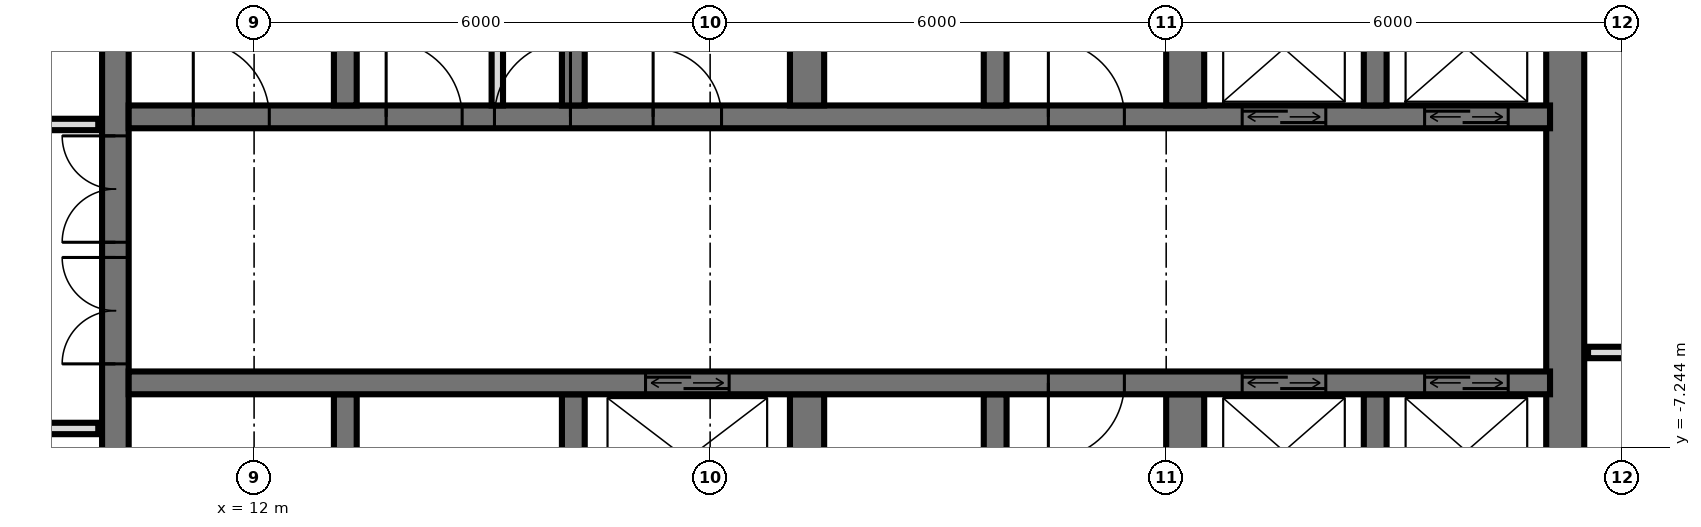
"""IFC4 building model, lengths in metres.
Left out: names, types, materials, properties, quantities, classifications, styles, units other than length and angle.
Written with IfcOpenShell. Run it as: python <this file> out.ifc"""

import sys

from ifc_helpers import new_model, si_unit, direction, frame, frame_2d, origin, place, context, subcontext, project, spatial, rectangle, extrude, element, fill, save


model = new_model("IFC4")
c1 = context("Model", 3, precision=1e-05, world=origin(), true_north=direction((0.0, 1.0)))
c2 = subcontext(c1, "Body", "Model", "MODEL_VIEW")
j1 = project(units=[si_unit("LENGTHUNIT", "METRE"), si_unit("PLANEANGLEUNIT", "RADIAN")], contexts=[c1])
p1 = place(None, origin())
s1 = spatial("IfcSite", under=j1, at=p1, CompositionType="ELEMENT")
p2 = place(p1, origin())
s2 = spatial("IfcBuilding", under=s1, at=p2, CompositionType="ELEMENT")
p3 = place(p2, frame((0.0, 0.0, 45.6)))
s3 = spatial("IfcBuildingStorey", under=s2, at=p3, CompositionType="ELEMENT", Elevation=45.6)
p4 = place(p3, frame((10.175, -14.55, 0.0), z_axis=(0.0, 0.0, 1.0), x_axis=(0.0, 1.0, 0.0)))
e1 = element("IfcWall", 1, at=p4, inside=s3, PredefinedType="SHEAR", context=c2, shape_type="SweptSolid", body=[
    extrude(rectangle(XDim=14.1, YDim=0.35, at=frame_2d((7.05, 0.0))), origin(), (0.0, 0.0, 1.0), 3.6),
])
p5 = place(p4, frame((8.4, 0.0, 0.0)))
e2 = element("IfcOpeningElement", 2, at=p5, cuts=e1, PredefinedType="OPENING", context=c2, shape_type="SweptSolid", body=[
    extrude(rectangle(XDim=1.4, YDim=2.4, at=frame_2d((0.7, 1.2))), frame((0.0, 0.185, 0.0), z_axis=(0.0, -1.0, 0.0), x_axis=(1.0, 0.0, 0.0)), (0.0, 0.0, 1.0), 0.37),
])
p6 = place(p4, frame((10.0, 0.0, 0.0)))
e3 = element("IfcOpeningElement", 3, at=p6, cuts=e1, PredefinedType="OPENING", context=c2, shape_type="SweptSolid", body=[
    extrude(rectangle(XDim=1.4, YDim=2.4, at=frame_2d((0.7, 1.2))), frame((0.0, 0.185, 0.0), z_axis=(0.0, -1.0, 0.0), x_axis=(1.0, 0.0, 0.0)), (0.0, 0.0, 1.0), 0.37),
])
p7 = place(p4, frame((4.0, 0.0, 0.0)))
e4 = element("IfcOpeningElement", 4, at=p7, cuts=e1, PredefinedType="OPENING", context=c2, shape_type="SweptSolid", body=[
    extrude(rectangle(XDim=1.2, YDim=2.1, at=frame_2d((0.6, 1.05))), frame((0.0, 0.185, 0.0), z_axis=(0.0, -1.0, 0.0), x_axis=(1.0, 0.0, 0.0)), (0.0, 0.0, 1.0), 0.37),
])
p8 = place(p3, frame((29.25, -14.55, 0.0), z_axis=(0.0, 0.0, 1.0), x_axis=(0.0, 1.0, 0.0)))
e5 = element("IfcWall", 5, at=p8, inside=s3, PredefinedType="SHEAR", context=c2, shape_type="SweptSolid", body=[
    extrude(rectangle(XDim=14.1, YDim=0.5, at=frame_2d((7.05, 0.0))), origin(), (0.0, 0.0, 1.0), 3.6),
])
p9 = place(p3, frame((10.35, -2.9, 0.0), z_axis=(0.0, 0.0, 1.0), x_axis=(1.0, 0.0, 0.0)))
e6 = element("IfcWall", 6, at=p9, inside=s3, PredefinedType="SHEAR", context=c2, shape_type="SweptSolid", body=[
    extrude(rectangle(XDim=18.7, YDim=0.3, at=frame_2d((9.35, 0.0))), origin(), (0.0, 0.0, 1.0), 3.6),
])
p10 = place(p9, frame((14.65, 0.0, 0.0)))
e7 = element("IfcOpeningElement", 7, at=p10, cuts=e6, PredefinedType="OPENING", context=c2, shape_type="SweptSolid", body=[
    extrude(rectangle(XDim=1.1, YDim=2.1, at=frame_2d((0.55, 1.05))), frame((0.0, 0.16, 0.0), z_axis=(0.0, -1.0, 0.0), x_axis=(1.0, 0.0, 0.0)), (0.0, 0.0, 1.0), 0.32),
])
p11 = place(p9, frame((17.05, 0.0, 0.0)))
e8 = element("IfcOpeningElement", 8, at=p11, cuts=e6, PredefinedType="OPENING", context=c2, shape_type="SweptSolid", body=[
    extrude(rectangle(XDim=1.1, YDim=2.1, at=frame_2d((0.55, 1.05))), frame((0.0, 0.16, 0.0), z_axis=(0.0, -1.0, 0.0), x_axis=(1.0, 0.0, 0.0)), (0.0, 0.0, 1.0), 0.32),
])
p12 = place(p9, frame((6.9, 0.0, 0.0)))
e9 = element("IfcOpeningElement", 9, at=p12, cuts=e6, PredefinedType="OPENING", context=c2, shape_type="SweptSolid", body=[
    extrude(rectangle(XDim=0.9, YDim=2.1, at=frame_2d((0.45, 1.05))), frame((0.0, 0.16, 0.0), z_axis=(0.0, -1.0, 0.0), x_axis=(1.0, 0.0, 0.0)), (0.0, 0.0, 1.0), 0.32),
])
p13 = place(p9, frame((0.85, 0.0, 0.0)))
e10 = element("IfcOpeningElement", 10, at=p13, cuts=e6, PredefinedType="OPENING", context=c2, shape_type="SweptSolid", body=[
    extrude(rectangle(XDim=1.0, YDim=2.1, at=frame_2d((0.5, 1.05))), frame((0.0, 0.16, 0.0), z_axis=(0.0, -1.0, 0.0), x_axis=(1.0, 0.0, 0.0)), (0.0, 0.0, 1.0), 0.32),
])
p14 = place(p9, frame((3.387, 0.0, 0.0)))
e11 = element("IfcOpeningElement", 11, at=p14, cuts=e6, PredefinedType="OPENING", context=c2, shape_type="SweptSolid", body=[
    extrude(rectangle(XDim=1.0, YDim=2.1, at=frame_2d((0.5, 1.05))), frame((0.0, 0.16, 0.0), z_axis=(0.0, -1.0, 0.0), x_axis=(1.0, 0.0, 0.0)), (0.0, 0.0, 1.0), 0.32),
])
p15 = place(p9, frame((4.812, 0.0, 0.0)))
e12 = element("IfcOpeningElement", 12, at=p15, cuts=e6, PredefinedType="OPENING", context=c2, shape_type="SweptSolid", body=[
    extrude(rectangle(XDim=1.0, YDim=2.1, at=frame_2d((0.5, 1.05))), frame((0.0, 0.16, 0.0), z_axis=(0.0, -1.0, 0.0), x_axis=(1.0, 0.0, 0.0)), (0.0, 0.0, 1.0), 0.32),
])
p16 = place(p9, frame((12.1, 0.0, 0.0)))
e13 = element("IfcOpeningElement", 13, at=p16, cuts=e6, PredefinedType="OPENING", context=c2, shape_type="SweptSolid", body=[
    extrude(rectangle(XDim=1.0, YDim=2.1, at=frame_2d((0.5, 1.05))), frame((0.0, 0.16, 0.0), z_axis=(0.0, -1.0, 0.0), x_axis=(1.0, 0.0, 0.0)), (0.0, 0.0, 1.0), 0.32),
])
p17 = place(p3, frame((10.35, -6.4, 0.0), z_axis=(0.0, 0.0, 1.0), x_axis=(1.0, 0.0, 0.0)))
e14 = element("IfcWall", 14, at=p17, inside=s3, PredefinedType="SHEAR", context=c2, shape_type="SweptSolid", body=[
    extrude(rectangle(XDim=18.7, YDim=0.3, at=frame_2d((9.35, 0.0))), origin(), (0.0, 0.0, 1.0), 3.6),
])
p18 = place(p17, frame((14.65, 0.0, 0.0)))
e15 = element("IfcOpeningElement", 15, at=p18, cuts=e14, PredefinedType="OPENING", context=c2, shape_type="SweptSolid", body=[
    extrude(rectangle(XDim=1.1, YDim=2.1, at=frame_2d((0.55, 1.05))), frame((0.0, 0.16, 0.0), z_axis=(0.0, -1.0, 0.0), x_axis=(1.0, 0.0, 0.0)), (0.0, 0.0, 1.0), 0.32),
])
p19 = place(p17, frame((17.05, 0.0, 0.0)))
e16 = element("IfcOpeningElement", 16, at=p19, cuts=e14, PredefinedType="OPENING", context=c2, shape_type="SweptSolid", body=[
    extrude(rectangle(XDim=1.1, YDim=2.1, at=frame_2d((0.55, 1.05))), frame((0.0, 0.16, 0.0), z_axis=(0.0, -1.0, 0.0), x_axis=(1.0, 0.0, 0.0)), (0.0, 0.0, 1.0), 0.32),
])
p20 = place(p17, frame((6.8, 0.0, 0.0)))
e17 = element("IfcOpeningElement", 17, at=p20, cuts=e14, PredefinedType="OPENING", context=c2, shape_type="SweptSolid", body=[
    extrude(rectangle(XDim=1.1, YDim=2.1, at=frame_2d((0.55, 1.05))), frame((0.0, 0.16, 0.0), z_axis=(0.0, -1.0, 0.0), x_axis=(1.0, 0.0, 0.0)), (0.0, 0.0, 1.0), 0.32),
])
p21 = place(p17, frame((12.1, 0.0, 0.0)))
e18 = element("IfcOpeningElement", 18, at=p21, cuts=e14, PredefinedType="OPENING", context=c2, shape_type="SweptSolid", body=[
    extrude(rectangle(XDim=1.0, YDim=2.1, at=frame_2d((0.5, 1.05))), frame((0.0, 0.16, 0.0), z_axis=(0.0, -1.0, 0.0), x_axis=(1.0, 0.0, 0.0)), (0.0, 0.0, 1.0), 0.32),
])
for number, where, z_axis, x_axis in (
    (19, (13.2, -2.75, 0.0), (0.0, 0.0, 1.0), (0.0, 1.0, 0.0)),
    (20, (13.2, -8.85, 0.0), (0.0, 0.0, 1.0), (0.0, 1.0, 0.0)),
    (21, (16.2, -2.75, 0.0), (0.0, 0.0, 1.0), (0.0, 1.0, 0.0)),
    (22, (16.2, -8.85, 0.0), (0.0, 0.0, 1.0), (0.0, 1.0, 0.0)),
):
    element("IfcWall", number, at=place(p3, frame(where, z_axis=z_axis, x_axis=x_axis)), inside=s3, PredefinedType="SHEAR", context=c2, shape_type="SweptSolid", body=[
        extrude(rectangle(XDim=2.3, YDim=0.3, at=frame_2d((1.15, 0.0))), origin(), (0.0, 0.0, 1.0), 3.6),
    ])
for number, where, z_axis, x_axis in (
    (23, (19.275, -2.75, 0.0), (0.0, 0.0, 1.0), (0.0, 1.0, 0.0)),
    (24, (19.275, -8.85, 0.0), (0.0, 0.0, 1.0), (0.0, 1.0, 0.0)),
):
    element("IfcWall", number, at=place(p3, frame(where, z_axis=z_axis, x_axis=x_axis)), inside=s3, PredefinedType="SHEAR", context=c2, shape_type="SweptSolid", body=[
        extrude(rectangle(XDim=2.3, YDim=0.45, at=frame_2d((1.15, 0.0))), origin(), (0.0, 0.0, 1.0), 3.6),
    ])
for number, where, z_axis, x_axis in (
    (25, (21.75, -2.75, 0.0), (0.0, 0.0, 1.0), (0.0, 1.0, 0.0)),
    (26, (21.75, -8.85, 0.0), (0.0, 0.0, 1.0), (0.0, 1.0, 0.0)),
):
    element("IfcWall", number, at=place(p3, frame(where, z_axis=z_axis, x_axis=x_axis)), inside=s3, PredefinedType="SHEAR", context=c2, shape_type="SweptSolid", body=[
        extrude(rectangle(XDim=2.3, YDim=0.3, at=frame_2d((1.15, 0.0))), origin(), (0.0, 0.0, 1.0), 3.6),
    ])
for number, where, z_axis, x_axis in (
    (27, (24.25, -2.75, 0.0), (0.0, 0.0, 1.0), (0.0, 1.0, 0.0)),
    (28, (24.25, -8.85, 0.0), (0.0, 0.0, 1.0), (0.0, 1.0, 0.0)),
):
    element("IfcWall", number, at=place(p3, frame(where, z_axis=z_axis, x_axis=x_axis)), inside=s3, PredefinedType="SHEAR", context=c2, shape_type="SweptSolid", body=[
        extrude(rectangle(XDim=2.3, YDim=0.5, at=frame_2d((1.15, 0.0))), origin(), (0.0, 0.0, 1.0), 3.6),
    ])
for number, where, z_axis, x_axis in (
    (29, (26.75, -2.75, 0.0), (0.0, 0.0, 1.0), (0.0, 1.0, 0.0)),
    (30, (26.75, -8.85, 0.0), (0.0, 0.0, 1.0), (0.0, 1.0, 0.0)),
):
    element("IfcWall", number, at=place(p3, frame(where, z_axis=z_axis, x_axis=x_axis)), inside=s3, PredefinedType="SHEAR", context=c2, shape_type="SweptSolid", body=[
        extrude(rectangle(XDim=2.3, YDim=0.3, at=frame_2d((1.15, 0.0))), origin(), (0.0, 0.0, 1.0), 3.6),
    ])
p22 = place(p3, frame((15.2, -2.75, 0.0), z_axis=(0.0, 0.0, 1.0), x_axis=(0.0, 1.0, 0.0)))
e31 = element("IfcWall", 31, at=p22, inside=s3, PredefinedType="PARTITIONING", context=c2, shape_type="SweptSolid", body=[
    extrude(rectangle(XDim=2.3, YDim=0.15, at=frame_2d((1.15, 0.0))), origin(), (0.0, 0.0, 1.0), 3.3),
])
p23 = place(p3, frame((-9.95, -7.0, 0.0), z_axis=(0.0, 0.0, 1.0), x_axis=(1.0, 0.0, 0.0)))
e32 = element("IfcWall", 32, at=p23, inside=s3, PredefinedType="PARTITIONING", context=c2, shape_type="SweptSolid", body=[
    extrude(rectangle(XDim=19.9, YDim=0.15, at=frame_2d((9.95, 0.0))), origin(), (0.0, 0.0, 1.0), 3.32),
])
p24 = place(p23, frame((9.45, 0.0, 0.0)))
e33 = element("IfcOpeningElement", 33, at=p24, cuts=e32, PredefinedType="OPENING", context=c2, shape_type="SweptSolid", body=[
    extrude(rectangle(XDim=1.0, YDim=2.1, at=frame_2d((0.5, 1.05))), frame((0.0, 0.085, 0.0), z_axis=(0.0, -1.0, 0.0), x_axis=(1.0, 0.0, 0.0)), (0.0, 0.0, 1.0), 0.17),
])
p25 = place(p23, frame((3.45, 0.0, 0.0)))
e34 = element("IfcOpeningElement", 34, at=p25, cuts=e32, PredefinedType="OPENING", context=c2, shape_type="SweptSolid", body=[
    extrude(rectangle(XDim=1.0, YDim=2.1, at=frame_2d((0.5, 1.05))), frame((0.0, 0.085, 0.0), z_axis=(0.0, -1.0, 0.0), x_axis=(1.0, 0.0, 0.0)), (0.0, 0.0, 1.0), 0.17),
])
p26 = place(p3, frame((29.55, -6.0, 0.0), z_axis=(0.0, 0.0, 1.0), x_axis=(1.0, 0.0, 0.0)))
e35 = element("IfcWall", 35, at=p26, inside=s3, PredefinedType="PARTITIONING", context=c2, shape_type="SweptSolid", body=[
    extrude(rectangle(XDim=3.57, YDim=0.15, at=frame_2d((1.785, 0.0))), origin(), (0.0, 0.0, 1.0), 3.32),
])
p27 = place(p26, frame((1.4, 0.0, 0.0)))
e36 = element("IfcOpeningElement", 36, at=p27, cuts=e35, PredefinedType="OPENING", context=c2, shape_type="SweptSolid", body=[
    extrude(rectangle(XDim=0.9, YDim=2.1, at=frame_2d((0.45, 1.05))), frame((0.0, 0.085, 0.0), z_axis=(0.0, -1.0, 0.0), x_axis=(1.0, 0.0, 0.0)), (0.0, 0.0, 1.0), 0.17),
])
p28 = place(p3, frame((-9.95, -3.0, 0.0), z_axis=(0.0, 0.0, 1.0), x_axis=(1.0, 0.0, 0.0)))
e37 = element("IfcWall", 37, at=p28, inside=s3, PredefinedType="PARTITIONING", context=c2, shape_type="SweptSolid", body=[
    extrude(rectangle(XDim=19.9, YDim=0.15, at=frame_2d((9.95, 0.0))), origin(), (0.0, 0.0, 1.0), 3.32),
])
p29 = place(p28, frame((4.2, 0.0, 0.0)))
e38 = element("IfcOpeningElement", 38, at=p29, cuts=e37, PredefinedType="OPENING", context=c2, shape_type="SweptSolid", body=[
    extrude(rectangle(XDim=1.0, YDim=2.1, at=frame_2d((0.5, 1.05))), frame((0.0, 0.085, 0.0), z_axis=(0.0, -1.0, 0.0), x_axis=(1.0, 0.0, 0.0)), (0.0, 0.0, 1.0), 0.17),
])
p30 = place(p28, frame((11.45, 0.0, 0.0)))
e39 = element("IfcOpeningElement", 39, at=p30, cuts=e37, PredefinedType="OPENING", context=c2, shape_type="SweptSolid", body=[
    extrude(rectangle(XDim=1.0, YDim=2.1, at=frame_2d((0.5, 1.05))), frame((0.0, 0.085, 0.0), z_axis=(0.0, -1.0, 0.0), x_axis=(1.0, 0.0, 0.0)), (0.0, 0.0, 1.0), 0.17),
])
p31 = place(p28, frame((15.45, 0.0, 0.0)))
e40 = element("IfcOpeningElement", 40, at=p31, cuts=e37, PredefinedType="OPENING", context=c2, shape_type="SweptSolid", body=[
    extrude(rectangle(XDim=1.0, YDim=2.1, at=frame_2d((0.5, 1.05))), frame((0.0, 0.085, 0.0), z_axis=(0.0, -1.0, 0.0), x_axis=(1.0, 0.0, 0.0)), (0.0, 0.0, 1.0), 0.17),
])
p32 = place(p28, frame((18.2, 0.0, 0.0)))
e41 = element("IfcOpeningElement", 41, at=p32, cuts=e37, PredefinedType="OPENING", context=c2, shape_type="SweptSolid", body=[
    extrude(rectangle(XDim=1.0, YDim=2.1, at=frame_2d((0.5, 1.05))), frame((0.0, 0.085, 0.0), z_axis=(0.0, -1.0, 0.0), x_axis=(1.0, 0.0, 0.0)), (0.0, 0.0, 1.0), 0.17),
])
p33 = place(p10, origin())
e42 = element("IfcDoor", 42, at=p33, inside=s3, OperationType="DOUBLE_DOOR_SLIDING", PredefinedType="USERDEFINED", context=c2, shape_type="SweptSolid", body=[
    extrude(rectangle(XDim=1.1, YDim=2.1, at=frame_2d((0.55, 1.05))), frame((0.0, 0.025, 0.0), z_axis=(0.0, -1.0, 0.0), x_axis=(1.0, 0.0, 0.0)), (0.0, 0.0, 1.0), 0.05),
])
fill(e7, e42)
p34 = place(p11, origin())
e43 = element("IfcDoor", 43, at=p34, inside=s3, OperationType="DOUBLE_DOOR_SLIDING", PredefinedType="USERDEFINED", context=c2, shape_type="SweptSolid", body=[
    extrude(rectangle(XDim=1.1, YDim=2.1, at=frame_2d((0.55, 1.05))), frame((0.0, 0.025, 0.0), z_axis=(0.0, -1.0, 0.0), x_axis=(1.0, 0.0, 0.0)), (0.0, 0.0, 1.0), 0.05),
])
fill(e8, e43)
p35 = place(p18, origin())
e44 = element("IfcDoor", 44, at=p35, inside=s3, OperationType="DOUBLE_DOOR_SLIDING", PredefinedType="USERDEFINED", context=c2, shape_type="SweptSolid", body=[
    extrude(rectangle(XDim=1.1, YDim=2.1, at=frame_2d((0.55, 1.05))), frame((0.0, 0.025, 0.0), z_axis=(0.0, -1.0, 0.0), x_axis=(1.0, 0.0, 0.0)), (0.0, 0.0, 1.0), 0.05),
])
fill(e15, e44)
p36 = place(p19, origin())
e45 = element("IfcDoor", 45, at=p36, inside=s3, OperationType="DOUBLE_DOOR_SLIDING", PredefinedType="USERDEFINED", context=c2, shape_type="SweptSolid", body=[
    extrude(rectangle(XDim=1.1, YDim=2.1, at=frame_2d((0.55, 1.05))), frame((0.0, 0.025, 0.0), z_axis=(0.0, -1.0, 0.0), x_axis=(1.0, 0.0, 0.0)), (0.0, 0.0, 1.0), 0.05),
])
fill(e16, e45)
p37 = place(p20, origin())
e46 = element("IfcDoor", 46, at=p37, inside=s3, OperationType="DOUBLE_DOOR_SLIDING", PredefinedType="USERDEFINED", context=c2, shape_type="SweptSolid", body=[
    extrude(rectangle(XDim=1.1, YDim=2.1, at=frame_2d((0.55, 1.05))), frame((0.0, 0.025, 0.0), z_axis=(0.0, -1.0, 0.0), x_axis=(1.0, 0.0, 0.0)), (0.0, 0.0, 1.0), 0.05),
])
fill(e17, e46)
p38 = place(p5, origin())
e47 = element("IfcDoor", 47, at=p38, inside=s3, OperationType="DOUBLE_DOOR_SINGLE_SWING", PredefinedType="DOOR", context=c2, shape_type="SweptSolid", body=[
    extrude(rectangle(XDim=1.4, YDim=2.4, at=frame_2d((0.7, 1.2))), frame((0.0, 0.025, 0.0), z_axis=(0.0, -1.0, 0.0), x_axis=(1.0, 0.0, 0.0)), (0.0, 0.0, 1.0), 0.05),
])
fill(e2, e47)
p39 = place(p6, origin())
e48 = element("IfcDoor", 48, at=p39, inside=s3, OperationType="DOUBLE_DOOR_SINGLE_SWING", PredefinedType="DOOR", context=c2, shape_type="SweptSolid", body=[
    extrude(rectangle(XDim=1.4, YDim=2.4, at=frame_2d((0.7, 1.2))), frame((0.0, 0.025, 0.0), z_axis=(0.0, -1.0, 0.0), x_axis=(1.0, 0.0, 0.0)), (0.0, 0.0, 1.0), 0.05),
])
fill(e3, e48)
p40 = place(p12, origin())
e49 = element("IfcDoor", 49, at=p40, inside=s3, OperationType="SINGLE_SWING_RIGHT", PredefinedType="DOOR", context=c2, shape_type="SweptSolid", body=[
    extrude(rectangle(XDim=0.9, YDim=2.1, at=frame_2d((0.45, 1.05))), frame((0.0, 0.025, 0.0), z_axis=(0.0, -1.0, 0.0), x_axis=(1.0, 0.0, 0.0)), (0.0, 0.0, 1.0), 0.05),
])
fill(e9, e49)
p41 = place(p13, origin())
e50 = element("IfcDoor", 50, at=p41, inside=s3, OperationType="SINGLE_SWING_RIGHT", PredefinedType="DOOR", context=c2, shape_type="SweptSolid", body=[
    extrude(rectangle(XDim=1.0, YDim=2.1, at=frame_2d((0.5, 1.05))), frame((0.0, 0.025, 0.0), z_axis=(0.0, -1.0, 0.0), x_axis=(1.0, 0.0, 0.0)), (0.0, 0.0, 1.0), 0.05),
])
fill(e10, e50)
p42 = place(p14, origin())
e51 = element("IfcDoor", 51, at=p42, inside=s3, OperationType="SINGLE_SWING_RIGHT", PredefinedType="DOOR", context=c2, shape_type="SweptSolid", body=[
    extrude(rectangle(XDim=1.0, YDim=2.1, at=frame_2d((0.5, 1.05))), frame((0.0, 0.025, 0.0), z_axis=(0.0, -1.0, 0.0), x_axis=(1.0, 0.0, 0.0)), (0.0, 0.0, 1.0), 0.05),
])
fill(e11, e51)
p43 = place(p15, origin())
e52 = element("IfcDoor", 52, at=p43, inside=s3, OperationType="SINGLE_SWING_LEFT", PredefinedType="DOOR", context=c2, shape_type="SweptSolid", body=[
    extrude(rectangle(XDim=1.0, YDim=2.1, at=frame_2d((0.5, 1.05))), frame((0.0, 0.025, 0.0), z_axis=(0.0, -1.0, 0.0), x_axis=(1.0, 0.0, 0.0)), (0.0, 0.0, 1.0), 0.05),
])
fill(e12, e52)
p44 = place(p16, origin())
e53 = element("IfcDoor", 53, at=p44, inside=s3, OperationType="SINGLE_SWING_RIGHT", PredefinedType="DOOR", context=c2, shape_type="SweptSolid", body=[
    extrude(rectangle(XDim=1.0, YDim=2.1, at=frame_2d((0.5, 1.05))), frame((0.0, 0.025, 0.0), z_axis=(0.0, -1.0, 0.0), x_axis=(1.0, 0.0, 0.0)), (0.0, 0.0, 1.0), 0.05),
])
fill(e13, e53)
p45 = place(p21, frame((0.5, 0.0, 0.0), z_axis=(0.0, 0.0, 1.0), x_axis=(-1.0, 0.0, 0.0)))
e54 = element("IfcDoor", 54, at=p45, inside=s3, OperationType="SINGLE_SWING_LEFT", PredefinedType="DOOR", context=c2, shape_type="SweptSolid", body=[
    extrude(rectangle(XDim=1.0, YDim=2.1, at=frame_2d((0.0, 1.05))), frame((0.0, -0.025, 0.0), z_axis=(0.0, 1.0, 0.0), x_axis=(-1.0, 0.0, 0.0)), (0.0, 0.0, 1.0), 0.05),
])
fill(e18, e54)
save(model, sys.argv[1])
